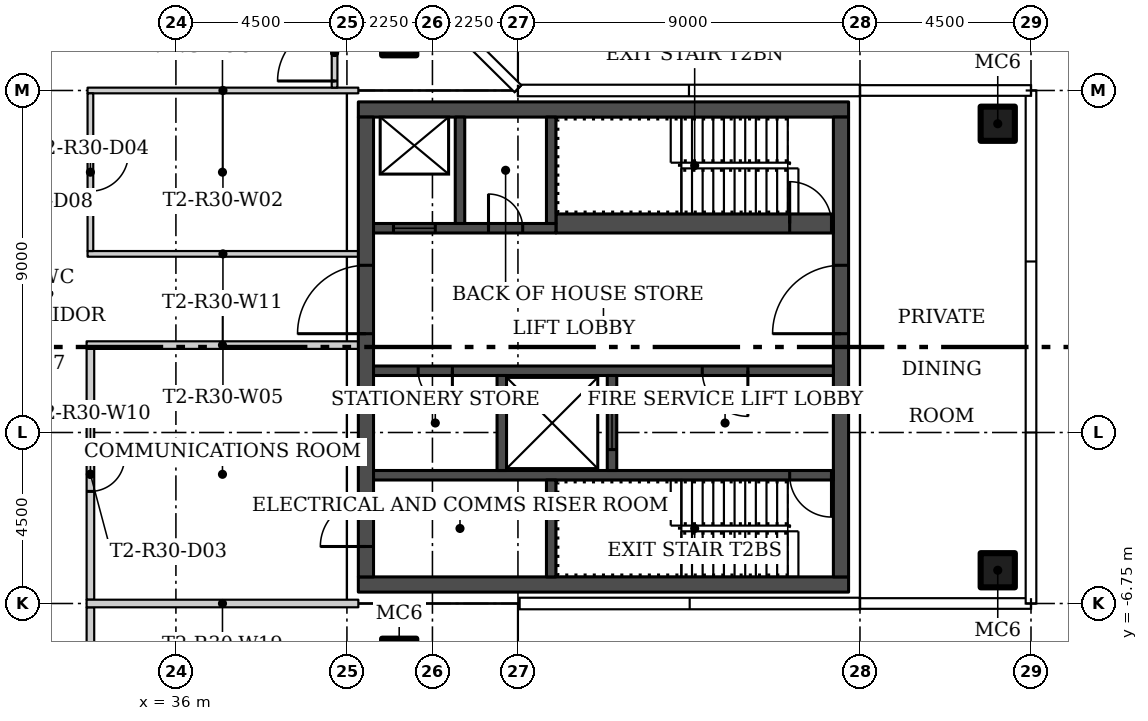
"""IFC4 building model, lengths in metres.
Left out: names, types, materials, properties, quantities, classifications, styles, units other than length and angle.
Written with IfcOpenShell. Run it as: python <this file> out.ifc"""

import sys

from ifc_helpers import new_model, si_unit, direction, frame, frame_2d, origin, origin_2d, place, context, subcontext, project, spatial, rectangle, hollow_rectangle, extrude, element, fill, save


model = new_model("IFC4")
c1 = context("Model", 3, precision=1e-05, world=origin(), true_north=direction((0.0, 1.0)))
c2 = subcontext(c1, "Body", "Model", "MODEL_VIEW")
j1 = project(units=[si_unit("LENGTHUNIT", "METRE"), si_unit("PLANEANGLEUNIT", "RADIAN")], contexts=[c1])
p1 = place(None, origin())
s1 = spatial("IfcSite", under=j1, at=p1, CompositionType="ELEMENT")
p2 = place(p1, origin())
s2 = spatial("IfcBuilding", under=s1, at=p2, CompositionType="ELEMENT")
p3 = place(p2, frame((0.0, 0.0, 269.4)))
s3 = spatial("IfcBuildingStorey", under=s2, at=p3, CompositionType="ELEMENT", Elevation=269.4)
for number, where in (
    (1, (41.875, 8.125, 0.0)),
    (2, (41.875, -8.125, 0.0)),
    (3, (57.625, -5.875, 0.0)),
    (4, (57.625, 5.875, 0.0)),
):
    element("IfcColumn", number, at=place(p3, frame(where)), inside=s3, PredefinedType="COLUMN", context=c2, shape_type="SweptSolid", body=[
        extrude(hollow_rectangle(XDim=0.9, YDim=0.9, WallThickness=0.036, at=origin_2d()), origin(), (0.0, 0.0, 1.0), 3.45),
    ])
p4 = place(p3, frame((40.8, 6.75, 0.0), z_axis=(0.0, 0.0, 1.0), x_axis=(-1.0, 0.0, 0.0)))
e5 = element("IfcWall", 5, at=p4, inside=s3, PredefinedType="PARTITIONING", context=c2, shape_type="SweptSolid", body=[
    extrude(rectangle(XDim=7.125, YDim=0.15, at=frame_2d((3.562, 0.0))), origin(), (0.0, 0.0, 1.0), 3.45),
])
p5 = place(p3, frame((33.675, 2.45, 0.0)))
e6 = element("IfcWall", 6, at=p5, inside=s3, PredefinedType="PARTITIONING", context=c2, shape_type="SweptSolid", body=[
    extrude(rectangle(XDim=7.125, YDim=0.15, at=frame_2d((3.562, 0.0))), origin(), (0.0, 0.0, 1.0), 3.45),
])
p6 = place(p3, frame((33.75, 6.675, 0.0), z_axis=(0.0, 0.0, 1.0), x_axis=(0.0, -1.0, 0.0)))
e7 = element("IfcWall", 7, at=p6, inside=s3, PredefinedType="PARTITIONING", context=c2, shape_type="SweptSolid", body=[
    extrude(rectangle(XDim=4.15, YDim=0.15, at=frame_2d((2.075, 0.0))), origin(), (0.0, 0.0, 1.0), 3.45),
])
p7 = place(p6, frame((1.575, 0.0, 0.0)))
e8 = element("IfcOpeningElement", 8, at=p7, cuts=e7, PredefinedType="OPENING", context=c2, shape_type="SweptSolid", body=[
    extrude(rectangle(XDim=1.0, YDim=2.4, at=frame_2d((0.5, 1.2))), frame((0.0, 0.085, 0.0), z_axis=(0.0, -1.0, 0.0), x_axis=(1.0, 0.0, 0.0)), (0.0, 0.0, 1.0), 0.17),
])
p8 = place(p3, frame((33.75, -0.05, 0.0), z_axis=(0.0, 0.0, 1.0), x_axis=(0.0, -1.0, 0.0)))
e9 = element("IfcWall", 9, at=p8, inside=s3, PredefinedType="PARTITIONING", context=c2, shape_type="SweptSolid", body=[
    extrude(rectangle(XDim=6.6, YDim=0.2, at=frame_2d((3.3, 0.0))), origin(), (0.0, 0.0, 1.0), 3.45),
])
p9 = place(p8, frame((2.85, 0.0, 0.0)))
e10 = element("IfcOpeningElement", 10, at=p9, cuts=e9, PredefinedType="OPENING", context=c2, shape_type="SweptSolid", body=[
    extrude(rectangle(XDim=0.9, YDim=2.1, at=frame_2d((0.45, 1.05))), frame((0.0, 0.11, 0.0), z_axis=(0.0, -1.0, 0.0), x_axis=(1.0, 0.0, 0.0)), (0.0, 0.0, 1.0), 0.22),
])
p10 = place(p3, frame((40.8, 0.05, 0.0), z_axis=(0.0, 0.0, 1.0), x_axis=(-1.0, 0.0, 0.0)))
e11 = element("IfcWall", 11, at=p10, inside=s3, PredefinedType="PARTITIONING", context=c2, shape_type="SweptSolid", body=[
    extrude(rectangle(XDim=7.15, YDim=0.2, at=frame_2d((3.575, 0.0))), origin(), (0.0, 0.0, 1.0), 3.45),
])
p11 = place(p3, frame((40.175, 6.825, 0.0), z_axis=(0.0, 0.0, 1.0), x_axis=(0.0, 1.0, 0.0)))
e12 = element("IfcWall", 12, at=p11, inside=s3, PredefinedType="PARTITIONING", context=c2, shape_type="SweptSolid", body=[
    extrude(rectangle(XDim=1.85, YDim=0.15, at=frame_2d((0.925, 0.0))), origin(), (0.0, 0.0, 1.0), 3.45),
])
p12 = place(p11, frame((0.175, 0.0, 0.0)))
e13 = element("IfcOpeningElement", 13, at=p12, cuts=e12, PredefinedType="OPENING", context=c2, shape_type="SweptSolid", body=[
    extrude(rectangle(XDim=1.5, YDim=2.1, at=frame_2d((0.75, 1.05))), frame((0.0, 0.085, 0.0), z_axis=(0.0, -1.0, 0.0), x_axis=(1.0, 0.0, 0.0)), (0.0, 0.0, 1.0), 0.17),
])
p13 = place(p3, frame((33.75, -6.85, 0.0), z_axis=(0.0, 0.0, 1.0), x_axis=(0.0, -1.0, 0.0)))
e14 = element("IfcWall", 14, at=p13, inside=s3, PredefinedType="PARTITIONING", context=c2, shape_type="SweptSolid", body=[
    extrude(rectangle(XDim=4.3, YDim=0.2, at=frame_2d((2.15, 0.0))), origin(), (0.0, 0.0, 1.0), 3.45),
])
p14 = place(p13, frame((1.4, 0.0, 0.0)))
e15 = element("IfcOpeningElement", 15, at=p14, cuts=e14, PredefinedType="OPENING", context=c2, shape_type="SweptSolid", body=[
    extrude(rectangle(XDim=1.5, YDim=2.4, at=frame_2d((0.75, 1.2))), frame((0.0, 0.11, 0.0), z_axis=(0.0, -1.0, 0.0), x_axis=(1.0, 0.0, 0.0)), (0.0, 0.0, 1.0), 0.22),
])
p15 = place(p3, frame((33.65, -6.75, 0.0)))
e16 = element("IfcWall", 16, at=p15, inside=s3, PredefinedType="PARTITIONING", context=c2, shape_type="SweptSolid", body=[
    extrude(rectangle(XDim=7.15, YDim=0.2, at=frame_2d((3.575, 0.0))), origin(), (0.0, 0.0, 1.0), 3.45),
])
for number, where, z_axis, x_axis in (
    (17, (53.7, -6.25, 0.0), (0.0, 0.0, 1.0), (-1.0, 0.0, 0.0)),
    (18, (53.7, 6.25, 0.0), (0.0, 0.0, 1.0), (-1.0, 0.0, 0.0)),
):
    element("IfcWall", number, at=place(p3, frame(where, z_axis=z_axis, x_axis=x_axis)), inside=s3, PredefinedType="SHEAR", context=c2, shape_type="SweptSolid", body=[
        extrude(rectangle(XDim=12.9, YDim=0.4, at=frame_2d((6.45, 0.0))), origin(), (0.0, 0.0, 1.0), 3.45),
    ])
p16 = place(p3, frame((53.5, -6.05, 0.0), z_axis=(0.0, 0.0, 1.0), x_axis=(0.0, 1.0, 0.0)))
e19 = element("IfcWall", 19, at=p16, inside=s3, PredefinedType="SHEAR", context=c2, shape_type="SweptSolid", body=[
    extrude(rectangle(XDim=12.1, YDim=0.4, at=frame_2d((6.05, 0.0))), origin(), (0.0, 0.0, 1.0), 3.45),
])
p17 = place(p16, frame((6.4, 0.0, 0.0)))
e20 = element("IfcOpeningElement", 20, at=p17, cuts=e19, PredefinedType="OPENING", context=c2, shape_type="SweptSolid", body=[
    extrude(rectangle(XDim=1.8, YDim=2.4, at=frame_2d((0.9, 1.2))), frame((0.0, 0.21, 0.0), z_axis=(0.0, -1.0, 0.0), x_axis=(1.0, 0.0, 0.0)), (0.0, 0.0, 1.0), 0.42),
])
p18 = place(p3, frame((41.0, -6.05, 0.0), z_axis=(0.0, 0.0, 1.0), x_axis=(0.0, 1.0, 0.0)))
e21 = element("IfcWall", 21, at=p18, inside=s3, PredefinedType="SHEAR", context=c2, shape_type="SweptSolid", body=[
    extrude(rectangle(XDim=12.1, YDim=0.4, at=frame_2d((6.05, 0.0))), origin(), (0.0, 0.0, 1.0), 3.45),
])
p19 = place(p18, frame((0.8, 0.0, 0.0)))
e22 = element("IfcOpeningElement", 22, at=p19, cuts=e21, PredefinedType="OPENING", context=c2, shape_type="SweptSolid", body=[
    extrude(rectangle(XDim=1.2, YDim=2.1, at=frame_2d((0.6, 1.05))), frame((0.0, 0.21, 0.0), z_axis=(0.0, -1.0, 0.0), x_axis=(1.0, 0.0, 0.0)), (0.0, 0.0, 1.0), 0.42),
])
p20 = place(p18, frame((6.4, 0.0, 0.0)))
e23 = element("IfcOpeningElement", 23, at=p20, cuts=e21, PredefinedType="OPENING", context=c2, shape_type="SweptSolid", body=[
    extrude(rectangle(XDim=1.8, YDim=2.4, at=frame_2d((0.9, 1.2))), frame((0.0, 0.21, 0.0), z_axis=(0.0, -1.0, 0.0), x_axis=(1.0, 0.0, 0.0)), (0.0, 0.0, 1.0), 0.42),
])
p21 = place(p3, frame((53.3, -3.375, 0.0), z_axis=(0.0, 0.0, 1.0), x_axis=(-1.0, 0.0, 0.0)))
e24 = element("IfcWall", 24, at=p21, inside=s3, PredefinedType="SHEAR", context=c2, shape_type="SweptSolid", body=[
    extrude(rectangle(XDim=12.1, YDim=0.25, at=frame_2d((6.05, 0.0))), origin(), (0.0, 0.0, 1.0), 3.45),
])
p22 = place(p21, frame((0.05, 0.0, 0.0)))
e25 = element("IfcOpeningElement", 25, at=p22, cuts=e24, PredefinedType="OPENING", context=c2, shape_type="SweptSolid", body=[
    extrude(rectangle(XDim=1.1, YDim=2.1, at=frame_2d((0.55, 1.05))), frame((0.0, 0.135, 0.0), z_axis=(0.0, -1.0, 0.0), x_axis=(1.0, 0.0, 0.0)), (0.0, 0.0, 1.0), 0.27),
])
p23 = place(p3, frame((45.875, -6.05, 0.0), z_axis=(0.0, 0.0, 1.0), x_axis=(0.0, 1.0, 0.0)))
e26 = element("IfcWall", 26, at=p23, inside=s3, PredefinedType="SHEAR", context=c2, shape_type="SweptSolid", body=[
    extrude(rectangle(XDim=2.55, YDim=0.25, at=frame_2d((1.275, 0.0))), origin(), (0.0, 0.0, 1.0), 3.45),
])
p24 = place(p3, frame((53.3, -0.625, 0.0), z_axis=(0.0, 0.0, 1.0), x_axis=(-1.0, 0.0, 0.0)))
e27 = element("IfcWall", 27, at=p24, inside=s3, PredefinedType="SHEAR", context=c2, shape_type="SweptSolid", body=[
    extrude(rectangle(XDim=12.1, YDim=0.25, at=frame_2d((6.05, 0.0))), origin(), (0.0, 0.0, 1.0), 3.45),
])
p25 = place(p24, frame((2.25, 0.0, 0.0)))
e28 = element("IfcOpeningElement", 28, at=p25, cuts=e27, PredefinedType="OPENING", context=c2, shape_type="SweptSolid", body=[
    extrude(rectangle(XDim=1.2, YDim=2.1, at=frame_2d((0.6, 1.05))), frame((0.0, 0.135, 0.0), z_axis=(0.0, -1.0, 0.0), x_axis=(1.0, 0.0, 0.0)), (0.0, 0.0, 1.0), 0.27),
])
p26 = place(p24, frame((10.025, 0.0, 0.0)))
e29 = element("IfcOpeningElement", 29, at=p26, cuts=e27, PredefinedType="OPENING", context=c2, shape_type="SweptSolid", body=[
    extrude(rectangle(XDim=0.9, YDim=2.1, at=frame_2d((0.45, 1.05))), frame((0.0, 0.135, 0.0), z_axis=(0.0, -1.0, 0.0), x_axis=(1.0, 0.0, 0.0)), (0.0, 0.0, 1.0), 0.27),
])
p27 = place(p3, frame((47.475, -3.25, 0.0), z_axis=(0.0, 0.0, 1.0), x_axis=(0.0, 1.0, 0.0)))
e30 = element("IfcWall", 30, at=p27, inside=s3, PredefinedType="SHEAR", context=c2, shape_type="SweptSolid", body=[
    extrude(rectangle(XDim=2.5, YDim=0.25, at=frame_2d((1.25, 0.0))), origin(), (0.0, 0.0, 1.0), 3.45),
])
p28 = place(p27, frame((0.55, 0.0, 0.0)))
e31 = element("IfcOpeningElement", 31, at=p28, cuts=e30, PredefinedType="OPENING", context=c2, shape_type="SweptSolid", body=[
    extrude(rectangle(XDim=1.4, YDim=2.4, at=frame_2d((0.7, 1.2))), frame((0.0, 0.135, 0.0), z_axis=(0.0, -1.0, 0.0), x_axis=(1.0, 0.0, 0.0)), (0.0, 0.0, 1.0), 0.27),
])
p29 = place(p3, frame((44.575, -3.25, 0.0), z_axis=(0.0, 0.0, 1.0), x_axis=(0.0, 1.0, 0.0)))
e32 = element("IfcWall", 32, at=p29, inside=s3, PredefinedType="SHEAR", context=c2, shape_type="SweptSolid", body=[
    extrude(rectangle(XDim=2.5, YDim=0.25, at=frame_2d((1.25, 0.0))), origin(), (0.0, 0.0, 1.0), 3.45),
])
p30 = place(p3, frame((46.0, 3.25, 0.0)))
e33 = element("IfcWall", 33, at=p30, inside=s3, PredefinedType="SHEAR", context=c2, shape_type="SweptSolid", body=[
    extrude(rectangle(XDim=7.3, YDim=0.5, at=frame_2d((3.65, 0.0))), origin(), (0.0, 0.0, 1.0), 3.45),
])
p31 = place(p30, frame((6.15, 0.0, 0.0)))
e34 = element("IfcOpeningElement", 34, at=p31, cuts=e33, PredefinedType="OPENING", context=c2, shape_type="SweptSolid", body=[
    extrude(rectangle(XDim=1.1, YDim=2.1, at=frame_2d((0.55, 1.05))), frame((0.0, 0.26, 0.0), z_axis=(0.0, -1.0, 0.0), x_axis=(1.0, 0.0, 0.0)), (0.0, 0.0, 1.0), 0.52),
])
p32 = place(p3, frame((41.2, 3.125, 0.0)))
e35 = element("IfcWall", 35, at=p32, inside=s3, PredefinedType="SHEAR", context=c2, shape_type="SweptSolid", body=[
    extrude(rectangle(XDim=4.8, YDim=0.25, at=frame_2d((2.4, 0.0))), origin(), (0.0, 0.0, 1.0), 3.45),
])
p33 = place(p32, frame((0.525, 0.0, 0.0)))
e36 = element("IfcOpeningElement", 36, at=p33, cuts=e35, PredefinedType="OPENING", context=c2, shape_type="SweptSolid", body=[
    extrude(rectangle(XDim=1.1, YDim=2.1, at=frame_2d((0.55, 1.05))), frame((0.0, 0.135, 0.0), z_axis=(0.0, -1.0, 0.0), x_axis=(1.0, 0.0, 0.0)), (0.0, 0.0, 1.0), 0.27),
])
p34 = place(p32, frame((3.025, 0.0, 0.0)))
e37 = element("IfcOpeningElement", 37, at=p34, cuts=e35, PredefinedType="OPENING", context=c2, shape_type="SweptSolid", body=[
    extrude(rectangle(XDim=0.9, YDim=2.1, at=frame_2d((0.45, 1.05))), frame((0.0, 0.135, 0.0), z_axis=(0.0, -1.0, 0.0), x_axis=(1.0, 0.0, 0.0)), (0.0, 0.0, 1.0), 0.27),
])
for number, where, z_axis, x_axis in (
    (38, (45.875, 3.25, 0.0), (0.0, 0.0, 1.0), (0.0, 1.0, 0.0)),
    (39, (43.475, 3.25, 0.0), (0.0, 0.0, 1.0), (0.0, 1.0, 0.0)),
):
    element("IfcWall", number, at=place(p3, frame(where, z_axis=z_axis, x_axis=x_axis)), inside=s3, PredefinedType="SHEAR", context=c2, shape_type="SweptSolid", body=[
        extrude(rectangle(XDim=2.8, YDim=0.25, at=frame_2d((1.4, 0.0))), origin(), (0.0, 0.0, 1.0), 3.45),
    ])
p35 = place(p12, origin())
e40 = element("IfcDoor", 40, at=p35, inside=s3, OperationType="DOUBLE_DOOR_SINGLE_SWING", PredefinedType="DOOR", context=c2, shape_type="SweptSolid", body=[
    extrude(rectangle(XDim=1.5, YDim=2.1, at=frame_2d((0.75, 1.05))), frame((0.0, 0.025, 0.0), z_axis=(0.0, -1.0, 0.0), x_axis=(1.0, 0.0, 0.0)), (0.0, 0.0, 1.0), 0.05),
])
fill(e13, e40)
p36 = place(p9, origin())
e41 = element("IfcDoor", 41, at=p36, inside=s3, OperationType="SINGLE_SWING_LEFT", PredefinedType="DOOR", context=c2, shape_type="SweptSolid", body=[
    extrude(rectangle(XDim=0.9, YDim=2.1, at=frame_2d((0.45, 1.05))), frame((0.0, 0.025, 0.0), z_axis=(0.0, -1.0, 0.0), x_axis=(1.0, 0.0, 0.0)), (0.0, 0.0, 1.0), 0.05),
])
fill(e10, e41)
p37 = place(p7, origin())
e42 = element("IfcDoor", 42, at=p37, inside=s3, OperationType="SINGLE_SWING_RIGHT", PredefinedType="DOOR", context=c2, shape_type="SweptSolid", body=[
    extrude(rectangle(XDim=1.0, YDim=2.4, at=frame_2d((0.5, 1.2))), frame((0.0, 0.025, 0.0), z_axis=(0.0, -1.0, 0.0), x_axis=(1.0, 0.0, 0.0)), (0.0, 0.0, 1.0), 0.05),
])
fill(e8, e42)
p38 = place(p17, origin())
e43 = element("IfcDoor", 43, at=p38, inside=s3, OperationType="DOUBLE_DOOR_SINGLE_SWING", PredefinedType="DOOR", context=c2, shape_type="SweptSolid", body=[
    extrude(rectangle(XDim=1.8, YDim=2.4, at=frame_2d((0.9, 1.2))), frame((0.0, 0.025, 0.0), z_axis=(0.0, -1.0, 0.0), x_axis=(1.0, 0.0, 0.0)), (0.0, 0.0, 1.0), 0.05),
])
fill(e20, e43)
p39 = place(p19, origin())
e44 = element("IfcDoor", 44, at=p39, inside=s3, OperationType="SINGLE_SWING_LEFT", PredefinedType="DOOR", context=c2, shape_type="SweptSolid", body=[
    extrude(rectangle(XDim=1.2, YDim=2.1, at=frame_2d((0.6, 1.05))), frame((0.0, 0.025, 0.0), z_axis=(0.0, -1.0, 0.0), x_axis=(1.0, 0.0, 0.0)), (0.0, 0.0, 1.0), 0.05),
])
fill(e22, e44)
p40 = place(p20, origin())
e45 = element("IfcDoor", 45, at=p40, inside=s3, OperationType="DOUBLE_DOOR_SINGLE_SWING", PredefinedType="DOOR", context=c2, shape_type="SweptSolid", body=[
    extrude(rectangle(XDim=1.8, YDim=2.4, at=frame_2d((0.9, 1.2))), frame((0.0, 0.025, 0.0), z_axis=(0.0, -1.0, 0.0), x_axis=(1.0, 0.0, 0.0)), (0.0, 0.0, 1.0), 0.05),
])
fill(e23, e45)
p41 = place(p22, origin())
e46 = element("IfcDoor", 46, at=p41, inside=s3, OperationType="SINGLE_SWING_LEFT", PredefinedType="DOOR", context=c2, shape_type="SweptSolid", body=[
    extrude(rectangle(XDim=1.1, YDim=2.1, at=frame_2d((0.55, 1.05))), frame((0.0, 0.025, 0.0), z_axis=(0.0, -1.0, 0.0), x_axis=(1.0, 0.0, 0.0)), (0.0, 0.0, 1.0), 0.05),
])
fill(e25, e46)
p42 = place(p25, origin())
e47 = element("IfcDoor", 47, at=p42, inside=s3, OperationType="SINGLE_SWING_LEFT", PredefinedType="DOOR", context=c2, shape_type="SweptSolid", body=[
    extrude(rectangle(XDim=1.2, YDim=2.1, at=frame_2d((0.6, 1.05))), frame((0.0, 0.025, 0.0), z_axis=(0.0, -1.0, 0.0), x_axis=(1.0, 0.0, 0.0)), (0.0, 0.0, 1.0), 0.05),
])
fill(e28, e47)
p43 = place(p26, origin())
e48 = element("IfcDoor", 48, at=p43, inside=s3, OperationType="SINGLE_SWING_RIGHT", PredefinedType="DOOR", context=c2, shape_type="SweptSolid", body=[
    extrude(rectangle(XDim=0.9, YDim=2.1, at=frame_2d((0.45, 1.05))), frame((0.0, 0.025, 0.0), z_axis=(0.0, -1.0, 0.0), x_axis=(1.0, 0.0, 0.0)), (0.0, 0.0, 1.0), 0.05),
])
fill(e29, e48)
p44 = place(p28, origin())
e49 = element("IfcDoor", 49, at=p44, inside=s3, OperationType="SLIDING_TO_LEFT", PredefinedType="DOOR", context=c2, shape_type="SweptSolid", body=[
    extrude(rectangle(XDim=1.4, YDim=2.4, at=frame_2d((0.7, 1.2))), frame((0.0, 0.025, 0.0), z_axis=(0.0, -1.0, 0.0), x_axis=(1.0, 0.0, 0.0)), (0.0, 0.0, 1.0), 0.05),
])
fill(e31, e49)
p45 = place(p31, origin())
e50 = element("IfcDoor", 50, at=p45, inside=s3, OperationType="SINGLE_SWING_RIGHT", PredefinedType="DOOR", context=c2, shape_type="SweptSolid", body=[
    extrude(rectangle(XDim=1.1, YDim=2.1, at=frame_2d((0.55, 1.05))), frame((0.0, 0.025, 0.0), z_axis=(0.0, -1.0, 0.0), x_axis=(1.0, 0.0, 0.0)), (0.0, 0.0, 1.0), 0.05),
])
fill(e34, e50)
p46 = place(p33, origin())
e51 = element("IfcDoor", 51, at=p46, inside=s3, OperationType="SLIDING_TO_LEFT", PredefinedType="DOOR", context=c2, shape_type="SweptSolid", body=[
    extrude(rectangle(XDim=1.1, YDim=2.1, at=frame_2d((0.55, 1.05))), frame((0.0, 0.025, 0.0), z_axis=(0.0, -1.0, 0.0), x_axis=(1.0, 0.0, 0.0)), (0.0, 0.0, 1.0), 0.05),
])
fill(e36, e51)
p47 = place(p34, origin())
e52 = element("IfcDoor", 52, at=p47, inside=s3, OperationType="SINGLE_SWING_RIGHT", PredefinedType="DOOR", context=c2, shape_type="SweptSolid", body=[
    extrude(rectangle(XDim=0.9, YDim=2.1, at=frame_2d((0.45, 1.05))), frame((0.0, 0.025, 0.0), z_axis=(0.0, -1.0, 0.0), x_axis=(1.0, 0.0, 0.0)), (0.0, 0.0, 1.0), 0.05),
])
fill(e37, e52)
save(model, sys.argv[1])
